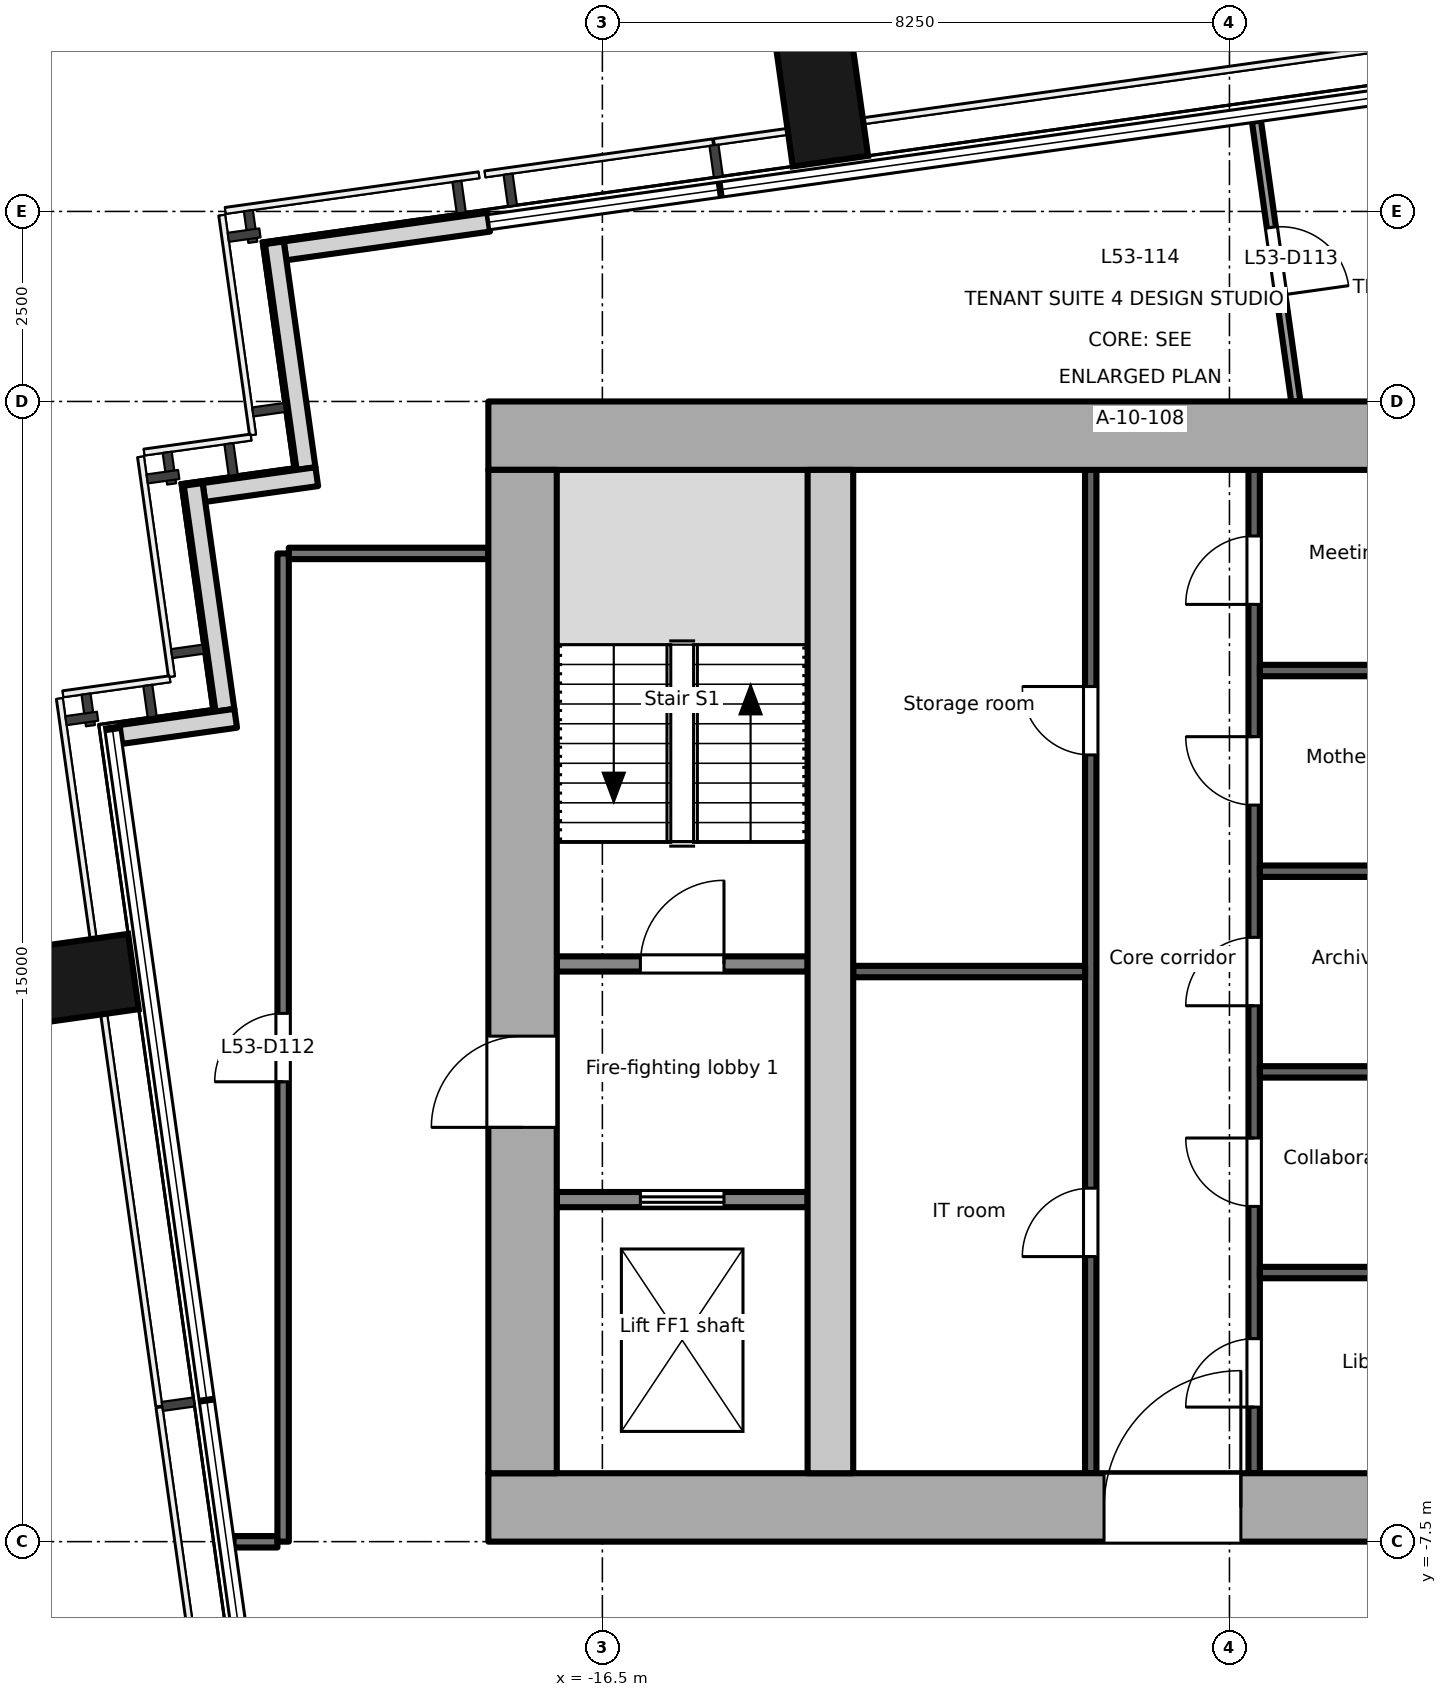
"""IFC4 building model, lengths in metres.
Left out: names, types, materials, properties, quantities, classifications, styles, units other than length and angle.
Written with IfcOpenShell. Run it as: python <this file> out.ifc"""

import sys

from ifc_helpers import new_model, si_unit, direction, frame, frame_2d, origin, origin_2d, place, context, subcontext, project, spatial, rectangle, extrude, element, fill, save


model = new_model("IFC4")
c1 = context("Model", 3, precision=1e-05, world=origin(), true_north=direction((0.0, 1.0)))
c2 = subcontext(c1, "Body", "Model", "MODEL_VIEW")
j1 = project(units=[si_unit("LENGTHUNIT", "METRE"), si_unit("PLANEANGLEUNIT", "RADIAN")], contexts=[c1])
p1 = place(None, origin())
s1 = spatial("IfcSite", under=j1, at=p1, CompositionType="ELEMENT")
p2 = place(p1, origin())
s2 = spatial("IfcBuilding", under=s1, at=p2, CompositionType="ELEMENT")
p3 = place(p2, frame((0.0, 0.0, 233.0)))
s3 = spatial("IfcBuildingStorey", under=s2, at=p3, CompositionType="ELEMENT", Elevation=233.0)
for number, where, z_axis, x_axis in (
    (1, (-23.561, -0.125, -0.2), (0.0, 0.0, 1.0), (-0.139, 0.99, 0.0)),
    (2, (-13.625, 11.553, -0.2), (0.0, 0.0, 1.0), (0.99, 0.139, 0.0)),
):
    element("IfcColumn", number, at=place(p3, frame(where, z_axis=z_axis, x_axis=x_axis)), inside=s3, PredefinedType="COLUMN", context=c2, shape_type="SweptSolid", body=[
        extrude(rectangle(XDim=1.0, YDim=1.8, at=origin_2d()), origin(), (0.0, 0.0, 1.0), 3.9),
    ])
p4 = place(p3, frame((-17.995, 9.859, 0.0), z_axis=(0.0, 0.0, 1.0), x_axis=(-0.99024510326, -0.139336411139, 0.0)))
e3 = element("IfcWall", 3, at=p4, inside=s3, PredefinedType="SOLIDWALL", context=c2, shape_type="SweptSolid", body=[
    extrude(rectangle(XDim=2.705, YDim=0.25, at=frame_2d((1.353, 0.0))), origin(), (0.0, 0.0, 1.0), 3.7),
])
p5 = place(p3, frame((-20.815, 9.588, 0.0), z_axis=(0.0, 0.0, 1.0), x_axis=(0.138983028379, -0.9902947631, 0.0)))
e4 = element("IfcWall", 4, at=p5, inside=s3, PredefinedType="SOLIDWALL", context=c2, shape_type="SweptSolid", body=[
    extrude(rectangle(XDim=3.0, YDim=0.25, at=frame_2d((1.5, 0.0))), origin(), (0.0, 0.0, 1.0), 3.7),
])
p6 = place(p3, frame((-20.257, 6.51, 0.0), z_axis=(0.0, 0.0, 1.0), x_axis=(-0.990330117064, -0.138730887823, 0.0)))
e5 = element("IfcWall", 5, at=p6, inside=s3, PredefinedType="SOLIDWALL", context=c2, shape_type="SweptSolid", body=[
    extrude(rectangle(XDim=1.499, YDim=0.25, at=frame_2d((0.75, 0.0))), origin(), (0.0, 0.0, 1.0), 3.7),
])
p7 = place(p3, frame((-21.883, 6.409, 0.0), z_axis=(0.0, 0.0, 1.0), x_axis=(0.139324658755, -0.990246756855, 0.0)))
e6 = element("IfcWall", 6, at=p7, inside=s3, PredefinedType="SOLIDWALL", context=c2, shape_type="SweptSolid", body=[
    extrude(rectangle(XDim=3.0, YDim=0.25, at=frame_2d((1.5, 0.0))), origin(), (0.0, 0.0, 1.0), 3.7),
])
p8 = place(p3, frame((-21.324, 3.332, 0.0), z_axis=(0.0, 0.0, 1.0), x_axis=(-0.990238641016, -0.139382329723, 0.0)))
e7 = element("IfcWall", 7, at=p8, inside=s3, PredefinedType="SOLIDWALL", context=c2, shape_type="SweptSolid", body=[
    extrude(rectangle(XDim=1.526, YDim=0.25, at=frame_2d((0.763, 0.0))), origin(), (0.0, 0.0, 1.0), 3.7),
])
p9 = place(p3, frame((-18.0, -7.05, -0.2), z_axis=(0.0, 0.0, 1.0), x_axis=(1.0, 0.0, 0.0)))
e8 = element("IfcWall", 8, at=p9, inside=s3, PredefinedType="SHEAR", context=c2, shape_type="SweptSolid", body=[
    extrude(rectangle(XDim=36.0, YDim=0.9, at=frame_2d((18.0, 0.0))), origin(), (0.0, 0.0, 1.0), 3.9),
])
p10 = place(p9, frame((8.1, 0.0, 0.2)))
e9 = element("IfcOpeningElement", 9, at=p10, cuts=e8, PredefinedType="OPENING", context=c2, shape_type="SweptSolid", body=[
    extrude(rectangle(XDim=1.8, YDim=2.1, at=frame_2d((0.9, 1.05))), frame((0.0, 0.46, 0.0), z_axis=(0.0, -1.0, 0.0), x_axis=(1.0, 0.0, 0.0)), (0.0, 0.0, 1.0), 0.921),
])
p11 = place(p9, frame((16.8, 0.0, 0.2)))
e10 = element("IfcOpeningElement", 10, at=p11, cuts=e8, PredefinedType="OPENING", context=c2, shape_type="SweptSolid", body=[
    extrude(rectangle(XDim=2.4, YDim=2.1, at=frame_2d((1.2, 1.05))), frame((0.0, 0.46, 0.0), z_axis=(0.0, -1.0, 0.0), x_axis=(1.0, 0.0, 0.0)), (0.0, 0.0, 1.0), 0.921),
])
p12 = place(p9, frame((26.1, 0.0, 0.2)))
e11 = element("IfcOpeningElement", 11, at=p12, cuts=e8, PredefinedType="OPENING", context=c2, shape_type="SweptSolid", body=[
    extrude(rectangle(XDim=2.4, YDim=2.1, at=frame_2d((1.2, 1.05))), frame((0.0, 0.46, 0.0), z_axis=(0.0, -1.0, 0.0), x_axis=(1.0, 0.0, 0.0)), (0.0, 0.0, 1.0), 0.921),
])
p13 = place(p3, frame((-18.0, 7.05, -0.2), z_axis=(0.0, 0.0, 1.0), x_axis=(1.0, 0.0, 0.0)))
e12 = element("IfcWall", 12, at=p13, inside=s3, PredefinedType="SHEAR", context=c2, shape_type="SweptSolid", body=[
    extrude(rectangle(XDim=36.0, YDim=0.9, at=frame_2d((18.0, 0.0))), origin(), (0.0, 0.0, 1.0), 3.9),
])
p14 = place(p3, frame((-17.55, -6.6, -0.2), z_axis=(0.0, 0.0, 1.0), x_axis=(0.0, 1.0, 0.0)))
e13 = element("IfcWall", 13, at=p14, inside=s3, PredefinedType="SHEAR", context=c2, shape_type="SweptSolid", body=[
    extrude(rectangle(XDim=13.2, YDim=0.9, at=frame_2d((6.6, 0.0))), origin(), (0.0, 0.0, 1.0), 3.9),
])
p15 = place(p14, frame((4.55, 0.0, 0.2)))
e14 = element("IfcOpeningElement", 14, at=p15, cuts=e13, PredefinedType="OPENING", context=c2, shape_type="SweptSolid", body=[
    extrude(rectangle(XDim=1.2, YDim=2.1, at=frame_2d((0.6, 1.05))), frame((0.0, 0.46, 0.0), z_axis=(0.0, -1.0, 0.0), x_axis=(1.0, 0.0, 0.0)), (0.0, 0.0, 1.0), 0.921),
])
p16 = place(p3, frame((-13.5, -6.6, -0.2), z_axis=(0.0, 0.0, 1.0), x_axis=(0.0, 1.0, 0.0)))
e15 = element("IfcWall", 15, at=p16, inside=s3, PredefinedType="SHEAR", context=c2, shape_type="SweptSolid", body=[
    extrude(rectangle(XDim=13.2, YDim=0.6, at=frame_2d((6.6, 0.0))), origin(), (0.0, 0.0, 1.0), 3.9),
])
p17 = place(p3, frame((-17.1, -3.0, 0.0), z_axis=(0.0, 0.0, 1.0), x_axis=(1.0, 0.0, 0.0)))
e16 = element("IfcWall", 16, at=p17, inside=s3, PredefinedType="PARTITIONING", context=c2, shape_type="SweptSolid", body=[
    extrude(rectangle(XDim=3.3, YDim=0.2, at=frame_2d((1.65, 0.0))), origin(), (0.0, 0.0, 1.0), 3.7),
])
p18 = place(p17, frame((1.1, 0.0, 0.0)))
e17 = element("IfcOpeningElement", 17, at=p18, cuts=e16, PredefinedType="OPENING", context=c2, shape_type="SweptSolid", body=[
    extrude(rectangle(XDim=1.1, YDim=2.1, at=frame_2d((0.55, 1.05))), frame((0.0, 0.111, 0.0), z_axis=(0.0, -1.0, 0.0), x_axis=(1.0, 0.0, 0.0)), (0.0, 0.0, 1.0), 0.221),
])
p19 = place(p3, frame((-17.1, 0.1, 0.0), z_axis=(0.0, 0.0, 1.0), x_axis=(1.0, 0.0, 0.0)))
e18 = element("IfcWall", 18, at=p19, inside=s3, PredefinedType="PARTITIONING", context=c2, shape_type="SweptSolid", body=[
    extrude(rectangle(XDim=3.3, YDim=0.2, at=frame_2d((1.65, 0.0))), origin(), (0.0, 0.0, 1.0), 3.7),
])
p20 = place(p19, frame((1.1, 0.0, 0.0)))
e19 = element("IfcOpeningElement", 19, at=p20, cuts=e18, PredefinedType="OPENING", context=c2, shape_type="SweptSolid", body=[
    extrude(rectangle(XDim=1.1, YDim=2.1, at=frame_2d((0.55, 1.05))), frame((0.0, 0.111, 0.0), z_axis=(0.0, -1.0, 0.0), x_axis=(1.0, 0.0, 0.0)), (0.0, 0.0, 1.0), 0.221),
])
p21 = place(p3, frame((-10.075, -6.6, 0.0), z_axis=(0.0, 0.0, 1.0), x_axis=(0.0, 1.0, 0.0)))
e20 = element("IfcWall", 20, at=p21, inside=s3, PredefinedType="PARTITIONING", context=c2, shape_type="SweptSolid", body=[
    extrude(rectangle(XDim=13.2, YDim=0.15, at=frame_2d((6.6, 0.0))), origin(), (0.0, 0.0, 1.0), 3.7),
])
p22 = place(p21, frame((2.85, 0.0, 0.0)))
e21 = element("IfcOpeningElement", 21, at=p22, cuts=e20, PredefinedType="OPENING", context=c2, shape_type="SweptSolid", body=[
    extrude(rectangle(XDim=0.9, YDim=2.1, at=frame_2d((0.45, 1.05))), frame((0.0, 0.085, 0.0), z_axis=(0.0, -1.0, 0.0), x_axis=(1.0, 0.0, 0.0)), (0.0, 0.0, 1.0), 0.171),
])
p23 = place(p21, frame((9.45, 0.0, 0.0)))
e22 = element("IfcOpeningElement", 22, at=p23, cuts=e20, PredefinedType="OPENING", context=c2, shape_type="SweptSolid", body=[
    extrude(rectangle(XDim=0.9, YDim=2.1, at=frame_2d((0.45, 1.05))), frame((0.0, 0.085, 0.0), z_axis=(0.0, -1.0, 0.0), x_axis=(1.0, 0.0, 0.0)), (0.0, 0.0, 1.0), 0.171),
])
p24 = place(p3, frame((-13.2, 0.0, 0.0), z_axis=(0.0, 0.0, 1.0), x_axis=(1.0, 0.0, 0.0)))
e23 = element("IfcWall", 23, at=p24, inside=s3, PredefinedType="PARTITIONING", context=c2, shape_type="SweptSolid", body=[
    extrude(rectangle(XDim=3.05, YDim=0.15, at=frame_2d((1.525, 0.0))), origin(), (0.0, 0.0, 1.0), 3.7),
])
p25 = place(p3, frame((-7.925, -6.6, 0.0), z_axis=(0.0, 0.0, 1.0), x_axis=(0.0, 1.0, 0.0)))
e24 = element("IfcWall", 24, at=p25, inside=s3, PredefinedType="PARTITIONING", context=c2, shape_type="SweptSolid", body=[
    extrude(rectangle(XDim=13.2, YDim=0.15, at=frame_2d((6.6, 0.0))), origin(), (0.0, 0.0, 1.0), 3.7),
])
p26 = place(p25, frame((0.87, 0.0, 0.0)))
e25 = element("IfcOpeningElement", 25, at=p26, cuts=e24, PredefinedType="OPENING", context=c2, shape_type="SweptSolid", body=[
    extrude(rectangle(XDim=0.9, YDim=2.1, at=frame_2d((0.45, 1.05))), frame((0.0, 0.085, 0.0), z_axis=(0.0, -1.0, 0.0), x_axis=(1.0, 0.0, 0.0)), (0.0, 0.0, 1.0), 0.171),
])
p27 = place(p25, frame((3.51, 0.0, 0.0)))
e26 = element("IfcOpeningElement", 26, at=p27, cuts=e24, PredefinedType="OPENING", context=c2, shape_type="SweptSolid", body=[
    extrude(rectangle(XDim=0.9, YDim=2.1, at=frame_2d((0.45, 1.05))), frame((0.0, 0.085, 0.0), z_axis=(0.0, -1.0, 0.0), x_axis=(1.0, 0.0, 0.0)), (0.0, 0.0, 1.0), 0.171),
])
p28 = place(p25, frame((6.15, 0.0, 0.0)))
e27 = element("IfcOpeningElement", 27, at=p28, cuts=e24, PredefinedType="OPENING", context=c2, shape_type="SweptSolid", body=[
    extrude(rectangle(XDim=0.9, YDim=2.1, at=frame_2d((0.45, 1.05))), frame((0.0, 0.085, 0.0), z_axis=(0.0, -1.0, 0.0), x_axis=(1.0, 0.0, 0.0)), (0.0, 0.0, 1.0), 0.171),
])
p29 = place(p25, frame((8.79, 0.0, 0.0)))
e28 = element("IfcOpeningElement", 28, at=p29, cuts=e24, PredefinedType="OPENING", context=c2, shape_type="SweptSolid", body=[
    extrude(rectangle(XDim=0.9, YDim=2.1, at=frame_2d((0.45, 1.05))), frame((0.0, 0.085, 0.0), z_axis=(0.0, -1.0, 0.0), x_axis=(1.0, 0.0, 0.0)), (0.0, 0.0, 1.0), 0.171),
])
p30 = place(p25, frame((11.43, 0.0, 0.0)))
e29 = element("IfcOpeningElement", 29, at=p30, cuts=e24, PredefinedType="OPENING", context=c2, shape_type="SweptSolid", body=[
    extrude(rectangle(XDim=0.9, YDim=2.1, at=frame_2d((0.45, 1.05))), frame((0.0, 0.085, 0.0), z_axis=(0.0, -1.0, 0.0), x_axis=(1.0, 0.0, 0.0)), (0.0, 0.0, 1.0), 0.171),
])
for number, where, z_axis, x_axis in (
    (30, (-7.85, -3.96, 0.0), (0.0, 0.0, 1.0), (1.0, 0.0, 0.0)),
    (31, (-7.85, -1.32, 0.0), (0.0, 0.0, 1.0), (1.0, 0.0, 0.0)),
    (32, (-7.85, 1.32, 0.0), (0.0, 0.0, 1.0), (1.0, 0.0, 0.0)),
    (33, (-7.85, 3.96, 0.0), (0.0, 0.0, 1.0), (1.0, 0.0, 0.0)),
):
    element("IfcWall", number, at=place(p3, frame(where, z_axis=z_axis, x_axis=x_axis)), inside=s3, PredefinedType="PARTITIONING", context=c2, shape_type="SweptSolid", body=[
        extrude(rectangle(XDim=3.05, YDim=0.15, at=frame_2d((1.525, 0.0))), origin(), (0.0, 0.0, 1.0), 3.7),
    ])
p31 = place(p3, frame((-21.352, -7.502, 0.0), z_axis=(0.0, 0.0, 1.0), x_axis=(1.0, 0.0, 0.0)))
e34 = element("IfcWall", 34, at=p31, inside=s3, PredefinedType="PARTITIONING", context=c2, shape_type="SweptSolid", body=[
    extrude(rectangle(XDim=0.577, YDim=0.15, at=frame_2d((0.289, 0.0))), origin(), (0.0, 0.0, 1.0), 3.7),
])
p32 = place(p3, frame((-20.7, -7.5, 0.0), z_axis=(0.0, 0.0, 1.0), x_axis=(0.0, 1.0, 0.0)))
e35 = element("IfcWall", 35, at=p32, inside=s3, PredefinedType="PARTITIONING", context=c2, shape_type="SweptSolid", body=[
    extrude(rectangle(XDim=13.0, YDim=0.15, at=frame_2d((6.5, 0.0))), origin(), (0.0, 0.0, 1.0), 3.4),
])
p33 = place(p32, frame((6.05, 0.0, 0.0)))
e36 = element("IfcOpeningElement", 36, at=p33, cuts=e35, PredefinedType="OPENING", context=c2, shape_type="SweptSolid", body=[
    extrude(rectangle(XDim=0.9, YDim=2.1, at=frame_2d((0.45, 1.05))), frame((0.0, 0.085, 0.0), z_axis=(0.0, -1.0, 0.0), x_axis=(1.0, 0.0, 0.0)), (0.0, 0.0, 1.0), 0.171),
])
p34 = place(p3, frame((-20.625, 5.501, 0.0), z_axis=(0.0, 0.0, 1.0), x_axis=(1.0, 0.0, 0.0)))
e37 = element("IfcWall", 37, at=p34, inside=s3, PredefinedType="PARTITIONING", context=c2, shape_type="SweptSolid", body=[
    extrude(rectangle(XDim=2.625, YDim=0.15, at=frame_2d((1.312, 0.0))), origin(), (0.0, 0.0, 1.0), 3.7),
])
p35 = place(p3, frame((-7.895, 11.188, 0.0), z_axis=(0.0, 0.0, 1.0), x_axis=(0.139108182039, -0.990277190331, 0.0)))
e38 = element("IfcWall", 38, at=p35, inside=s3, PredefinedType="PARTITIONING", context=c2, shape_type="SweptSolid", body=[
    extrude(rectangle(XDim=3.724, YDim=0.12, at=frame_2d((1.862, 0.0))), origin(), (0.0, 0.0, 1.0), 3.7),
])
p36 = place(p35, frame((1.412, 0.0, 0.0)))
e39 = element("IfcOpeningElement", 39, at=p36, cuts=e38, PredefinedType="OPENING", context=c2, shape_type="SweptSolid", body=[
    extrude(rectangle(XDim=0.9, YDim=2.1, at=frame_2d((0.45, 1.05))), frame((0.0, 0.071, 0.0), z_axis=(0.0, -1.0, 0.0), x_axis=(1.0, 0.0, 0.0)), (0.0, 0.0, 1.0), 0.141),
])
p37 = place(p18, origin())
e40 = element("IfcDoor", 40, at=p37, inside=s3, OperationType="DOUBLE_DOOR_SLIDING", PredefinedType="DOOR", context=c2, shape_type="SweptSolid", body=[
    extrude(rectangle(XDim=1.1, YDim=2.1, at=frame_2d((0.55, 1.05))), frame((0.0, 0.025, 0.0), z_axis=(0.0, -1.0, 0.0), x_axis=(1.0, 0.0, 0.0)), (0.0, 0.0, 1.0), 0.05),
])
fill(e17, e40)
p38 = place(p15, origin())
e41 = element("IfcDoor", 41, at=p38, inside=s3, OperationType="SINGLE_SWING_LEFT", PredefinedType="DOOR", context=c2, shape_type="SweptSolid", body=[
    extrude(rectangle(XDim=1.2, YDim=2.1, at=frame_2d((0.6, 1.05))), frame((0.0, 0.025, 0.0), z_axis=(0.0, -1.0, 0.0), x_axis=(1.0, 0.0, 0.0)), (0.0, 0.0, 1.0), 0.05),
])
fill(e14, e41)
p39 = place(p20, origin())
e42 = element("IfcDoor", 42, at=p39, inside=s3, OperationType="SINGLE_SWING_RIGHT", PredefinedType="DOOR", context=c2, shape_type="SweptSolid", body=[
    extrude(rectangle(XDim=1.1, YDim=2.1, at=frame_2d((0.55, 1.05))), frame((0.0, 0.025, 0.0), z_axis=(0.0, -1.0, 0.0), x_axis=(1.0, 0.0, 0.0)), (0.0, 0.0, 1.0), 0.05),
])
fill(e19, e42)
p40 = place(p22, origin())
e43 = element("IfcDoor", 43, at=p40, inside=s3, OperationType="SINGLE_SWING_LEFT", PredefinedType="DOOR", context=c2, shape_type="SweptSolid", body=[
    extrude(rectangle(XDim=0.9, YDim=2.1, at=frame_2d((0.45, 1.05))), frame((0.0, 0.025, 0.0), z_axis=(0.0, -1.0, 0.0), x_axis=(1.0, 0.0, 0.0)), (0.0, 0.0, 1.0), 0.05),
])
fill(e21, e43)
p41 = place(p23, origin())
e44 = element("IfcDoor", 44, at=p41, inside=s3, OperationType="SINGLE_SWING_RIGHT", PredefinedType="DOOR", context=c2, shape_type="SweptSolid", body=[
    extrude(rectangle(XDim=0.9, YDim=2.1, at=frame_2d((0.45, 1.05))), frame((0.0, 0.025, 0.0), z_axis=(0.0, -1.0, 0.0), x_axis=(1.0, 0.0, 0.0)), (0.0, 0.0, 1.0), 0.05),
])
fill(e22, e44)
p42 = place(p26, origin())
e45 = element("IfcDoor", 45, at=p42, inside=s3, OperationType="SINGLE_SWING_LEFT", PredefinedType="DOOR", context=c2, shape_type="SweptSolid", body=[
    extrude(rectangle(XDim=0.9, YDim=2.1, at=frame_2d((0.45, 1.05))), frame((0.0, 0.025, 0.0), z_axis=(0.0, -1.0, 0.0), x_axis=(1.0, 0.0, 0.0)), (0.0, 0.0, 1.0), 0.05),
])
fill(e25, e45)
p43 = place(p27, origin())
e46 = element("IfcDoor", 46, at=p43, inside=s3, OperationType="SINGLE_SWING_RIGHT", PredefinedType="DOOR", context=c2, shape_type="SweptSolid", body=[
    extrude(rectangle(XDim=0.9, YDim=2.1, at=frame_2d((0.45, 1.05))), frame((0.0, 0.025, 0.0), z_axis=(0.0, -1.0, 0.0), x_axis=(1.0, 0.0, 0.0)), (0.0, 0.0, 1.0), 0.05),
])
fill(e26, e46)
p44 = place(p28, origin())
e47 = element("IfcDoor", 47, at=p44, inside=s3, OperationType="SINGLE_SWING_LEFT", PredefinedType="DOOR", context=c2, shape_type="SweptSolid", body=[
    extrude(rectangle(XDim=0.9, YDim=2.1, at=frame_2d((0.45, 1.05))), frame((0.0, 0.025, 0.0), z_axis=(0.0, -1.0, 0.0), x_axis=(1.0, 0.0, 0.0)), (0.0, 0.0, 1.0), 0.05),
])
fill(e27, e47)
p45 = place(p29, origin())
e48 = element("IfcDoor", 48, at=p45, inside=s3, OperationType="SINGLE_SWING_RIGHT", PredefinedType="DOOR", context=c2, shape_type="SweptSolid", body=[
    extrude(rectangle(XDim=0.9, YDim=2.1, at=frame_2d((0.45, 1.05))), frame((0.0, 0.025, 0.0), z_axis=(0.0, -1.0, 0.0), x_axis=(1.0, 0.0, 0.0)), (0.0, 0.0, 1.0), 0.05),
])
fill(e28, e48)
p46 = place(p30, origin())
e49 = element("IfcDoor", 49, at=p46, inside=s3, OperationType="SINGLE_SWING_LEFT", PredefinedType="DOOR", context=c2, shape_type="SweptSolid", body=[
    extrude(rectangle(XDim=0.9, YDim=2.1, at=frame_2d((0.45, 1.05))), frame((0.0, 0.025, 0.0), z_axis=(0.0, -1.0, 0.0), x_axis=(1.0, 0.0, 0.0)), (0.0, 0.0, 1.0), 0.05),
])
fill(e29, e49)
p47 = place(p10, origin())
e50 = element("IfcDoor", 50, at=p47, inside=s3, OperationType="SINGLE_SWING_RIGHT", PredefinedType="DOOR", context=c2, shape_type="SweptSolid", body=[
    extrude(rectangle(XDim=1.8, YDim=2.1, at=frame_2d((0.9, 1.05))), frame((0.0, 0.025, 0.0), z_axis=(0.0, -1.0, 0.0), x_axis=(1.0, 0.0, 0.0)), (0.0, 0.0, 1.0), 0.05),
])
fill(e9, e50)
p48 = place(p33, origin())
e51 = element("IfcDoor", 51, at=p48, inside=s3, OperationType="SINGLE_SWING_LEFT", PredefinedType="DOOR", context=c2, shape_type="SweptSolid", body=[
    extrude(rectangle(XDim=0.9, YDim=2.1, at=frame_2d((0.45, 1.05))), frame((0.0, 0.025, 0.0), z_axis=(0.0, -1.0, 0.0), x_axis=(1.0, 0.0, 0.0)), (0.0, 0.0, 1.0), 0.05),
])
fill(e36, e51)
p49 = place(p36, origin())
e52 = element("IfcDoor", 52, at=p49, inside=s3, OperationType="SINGLE_SWING_RIGHT", PredefinedType="DOOR", context=c2, shape_type="SweptSolid", body=[
    extrude(rectangle(XDim=0.9, YDim=2.1, at=frame_2d((0.45, 1.05))), frame((0.0, 0.025, 0.0), z_axis=(0.0, -1.0, 0.0), x_axis=(1.0, 0.0, 0.0)), (0.0, 0.0, 1.0), 0.05),
])
fill(e39, e52)
save(model, sys.argv[1])
